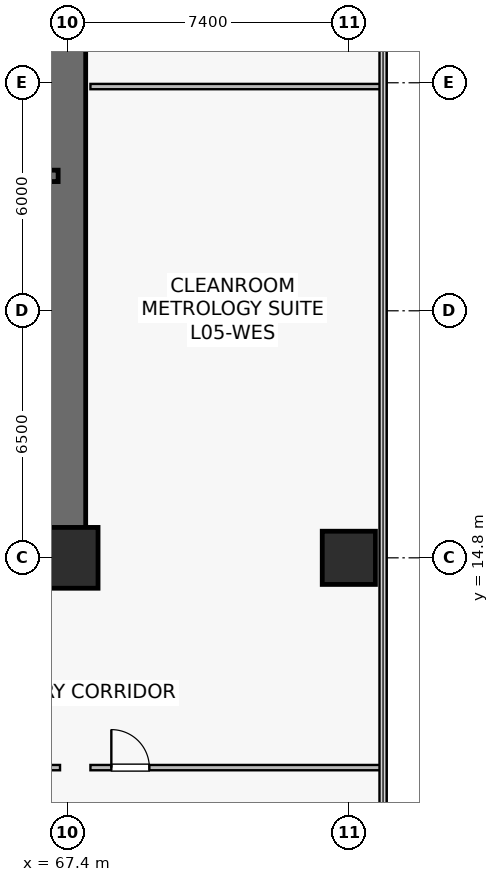
"""IFC4 building model, lengths in metres.
Left out: names, types, materials, properties, quantities, classifications, styles, units other than length and angle.
Written with IfcOpenShell. Run it as: python <this file> out.ifc"""

import sys

from ifc_helpers import new_model, si_unit, direction, frame, frame_2d, origin, origin_2d, place, context, subcontext, project, spatial, rectangle, extrude, source, transform, mapped, element, fill, save


model = new_model("IFC4")
c1 = context("Model", 3, precision=1e-05, world=origin(), true_north=direction((0.0, 1.0)))
c2 = subcontext(c1, "Body", "Model", "MODEL_VIEW")
j1 = project(units=[si_unit("LENGTHUNIT", "METRE"), si_unit("PLANEANGLEUNIT", "RADIAN")], contexts=[c1])
p1 = place(None, origin())
s1 = spatial("IfcSite", under=j1, at=p1, CompositionType="ELEMENT")
p2 = place(p1, origin())
s2 = spatial("IfcBuilding", under=s1, at=p2, CompositionType="ELEMENT")
p3 = place(p2, frame((0.0, 0.0, 19.8)))
s3 = spatial("IfcBuildingStorey", under=s2, at=p3, CompositionType="ELEMENT", Elevation=19.8)
p4 = place(p3, frame((52.125, 14.8, 0.0), z_axis=(0.0, 0.0, 1.0), x_axis=(1.0, 0.0, 0.0)))
e1 = element("IfcWall", 1, at=p4, inside=s3, PredefinedType="SHEAR", context=c2, shape_type="SweptSolid", body=[
    extrude(rectangle(XDim=15.75, YDim=0.95, at=frame_2d((7.875, 0.0))), origin(), (0.0, 0.0, 1.0), 5.08),
])
p5 = place(p3, frame((67.4, 15.275, 0.0), z_axis=(0.0, 0.0, 1.0), x_axis=(0.0, 1.0, 0.0)))
e2 = element("IfcWall", 2, at=p5, inside=s3, PredefinedType="SHEAR", context=c2, shape_type="SweptSolid", body=[
    extrude(rectangle(XDim=18.05, YDim=0.95, at=frame_2d((9.025, 0.0))), origin(), (0.0, 0.0, 1.0), 5.08),
])
p6 = place(p3, frame((63.35, 24.85, 0.0), z_axis=(0.0, 0.0, 1.0), x_axis=(1.0, 0.0, 0.0)))
e3 = element("IfcWall", 3, at=p6, inside=s3, PredefinedType="SHEAR", context=c2, shape_type="SweptSolid", body=[
    extrude(rectangle(XDim=3.8, YDim=0.3, at=frame_2d((1.9, 0.0))), origin(), (0.0, 0.0, 1.0), 5.08),
])
m1 = source(origin(), c2, "Body", "SweptSolid", [
    extrude(rectangle(XDim=1.6, YDim=1.6, at=origin_2d()), origin(), (0.0, 0.0, 1.0), 5.4),
])
p7 = place(p3, frame((67.4, 14.8, 0.0), z_axis=(0.0, 0.0, 1.0), x_axis=(1.0, 0.0, 0.0)))
e4 = element("IfcColumn", 4, at=p7, inside=s3, PredefinedType="COLUMN", context=c2, shape_type="MappedRepresentation", body=[
    mapped(m1, transform((0.0, 0.0, 0.0), scale=1.0)),
])
m2 = source(origin(), c2, "Body", "SweptSolid", [
    extrude(rectangle(XDim=1.4, YDim=1.4, at=origin_2d()), origin(), (0.0, 0.0, 1.0), 5.4),
])
p8 = place(p3, frame((74.8, 14.8, 0.0), z_axis=(0.0, 0.0, 1.0), x_axis=(1.0, 0.0, 0.0)))
e5 = element("IfcColumn", 5, at=p8, inside=s3, PredefinedType="COLUMN", context=c2, shape_type="MappedRepresentation", body=[
    mapped(m2, transform((0.0, 0.0, 0.0), scale=1.0)),
])
p9 = place(p3, frame((59.25, 9.28, 0.0), z_axis=(0.0, 0.0, 1.0), x_axis=(1.0, 0.0, 0.0)))
e6 = element("IfcWall", 6, at=p9, inside=s3, PredefinedType="PARTITIONING", context=c2, shape_type="SweptSolid", body=[
    extrude(rectangle(XDim=7.95, YDim=0.14, at=frame_2d((3.975, 0.0))), origin(), (0.0, 0.0, 1.0), 4.365),
])
p10 = place(p9, frame((3.425, 0.0, 0.0)))
e7 = element("IfcOpeningElement", 7, at=p10, cuts=e6, PredefinedType="OPENING", context=c2, shape_type="SweptSolid", body=[
    extrude(rectangle(XDim=1.1, YDim=2.18, at=frame_2d((0.55, 1.09))), frame((0.0, 0.08, 0.0), z_axis=(0.0, -1.0, 0.0), x_axis=(1.0, 0.0, 0.0)), (0.0, 0.0, 1.0), 0.16),
])
p11 = place(p3, frame((68.0, 27.2, 0.0), z_axis=(0.0, 0.0, 1.0), x_axis=(1.0, 0.0, 0.0)))
e8 = element("IfcWall", 8, at=p11, inside=s3, PredefinedType="PARTITIONING", context=c2, shape_type="SweptSolid", body=[
    extrude(rectangle(XDim=7.65, YDim=0.14, at=frame_2d((3.825, 0.0))), origin(), (0.0, 0.0, 1.0), 4.465),
])
p12 = place(p3, frame((68.0, 9.28, 0.0), z_axis=(0.0, 0.0, 1.0), x_axis=(1.0, 0.0, 0.0)))
e9 = element("IfcWall", 9, at=p12, inside=s3, PredefinedType="PARTITIONING", context=c2, shape_type="SweptSolid", body=[
    extrude(rectangle(XDim=7.65, YDim=0.14, at=frame_2d((3.825, 0.0))), origin(), (0.0, 0.0, 1.0), 4.465),
])
p13 = place(p12, frame((0.55, 0.0, 0.0)))
e10 = element("IfcOpeningElement", 10, at=p13, cuts=e9, PredefinedType="OPENING", context=c2, shape_type="SweptSolid", body=[
    extrude(rectangle(XDim=1.0, YDim=2.15, at=frame_2d((0.5, 1.075))), frame((0.0, 0.08, 0.0), z_axis=(0.0, -1.0, 0.0), x_axis=(1.0, 0.0, 0.0)), (0.0, 0.0, 1.0), 0.16),
])
m3 = source(origin(), c2, "Body", "SweptSolid", [
    extrude(rectangle(XDim=1.0, YDim=2.15, at=frame_2d((0.5, 1.075))), frame((0.0, 0.025, 0.0), z_axis=(0.0, -1.0, 0.0), x_axis=(1.0, 0.0, 0.0)), (0.0, 0.0, 1.0), 0.05),
])
p14 = place(p13, origin())
e11 = element("IfcDoor", 11, at=p14, inside=s3, OperationType="SINGLE_SWING_LEFT", PredefinedType="DOOR", context=c2, shape_type="MappedRepresentation", body=[
    mapped(m3, transform((0.0, 0.0, 0.0), scale=1.0)),
])
fill(e10, e11)
save(model, sys.argv[1])
